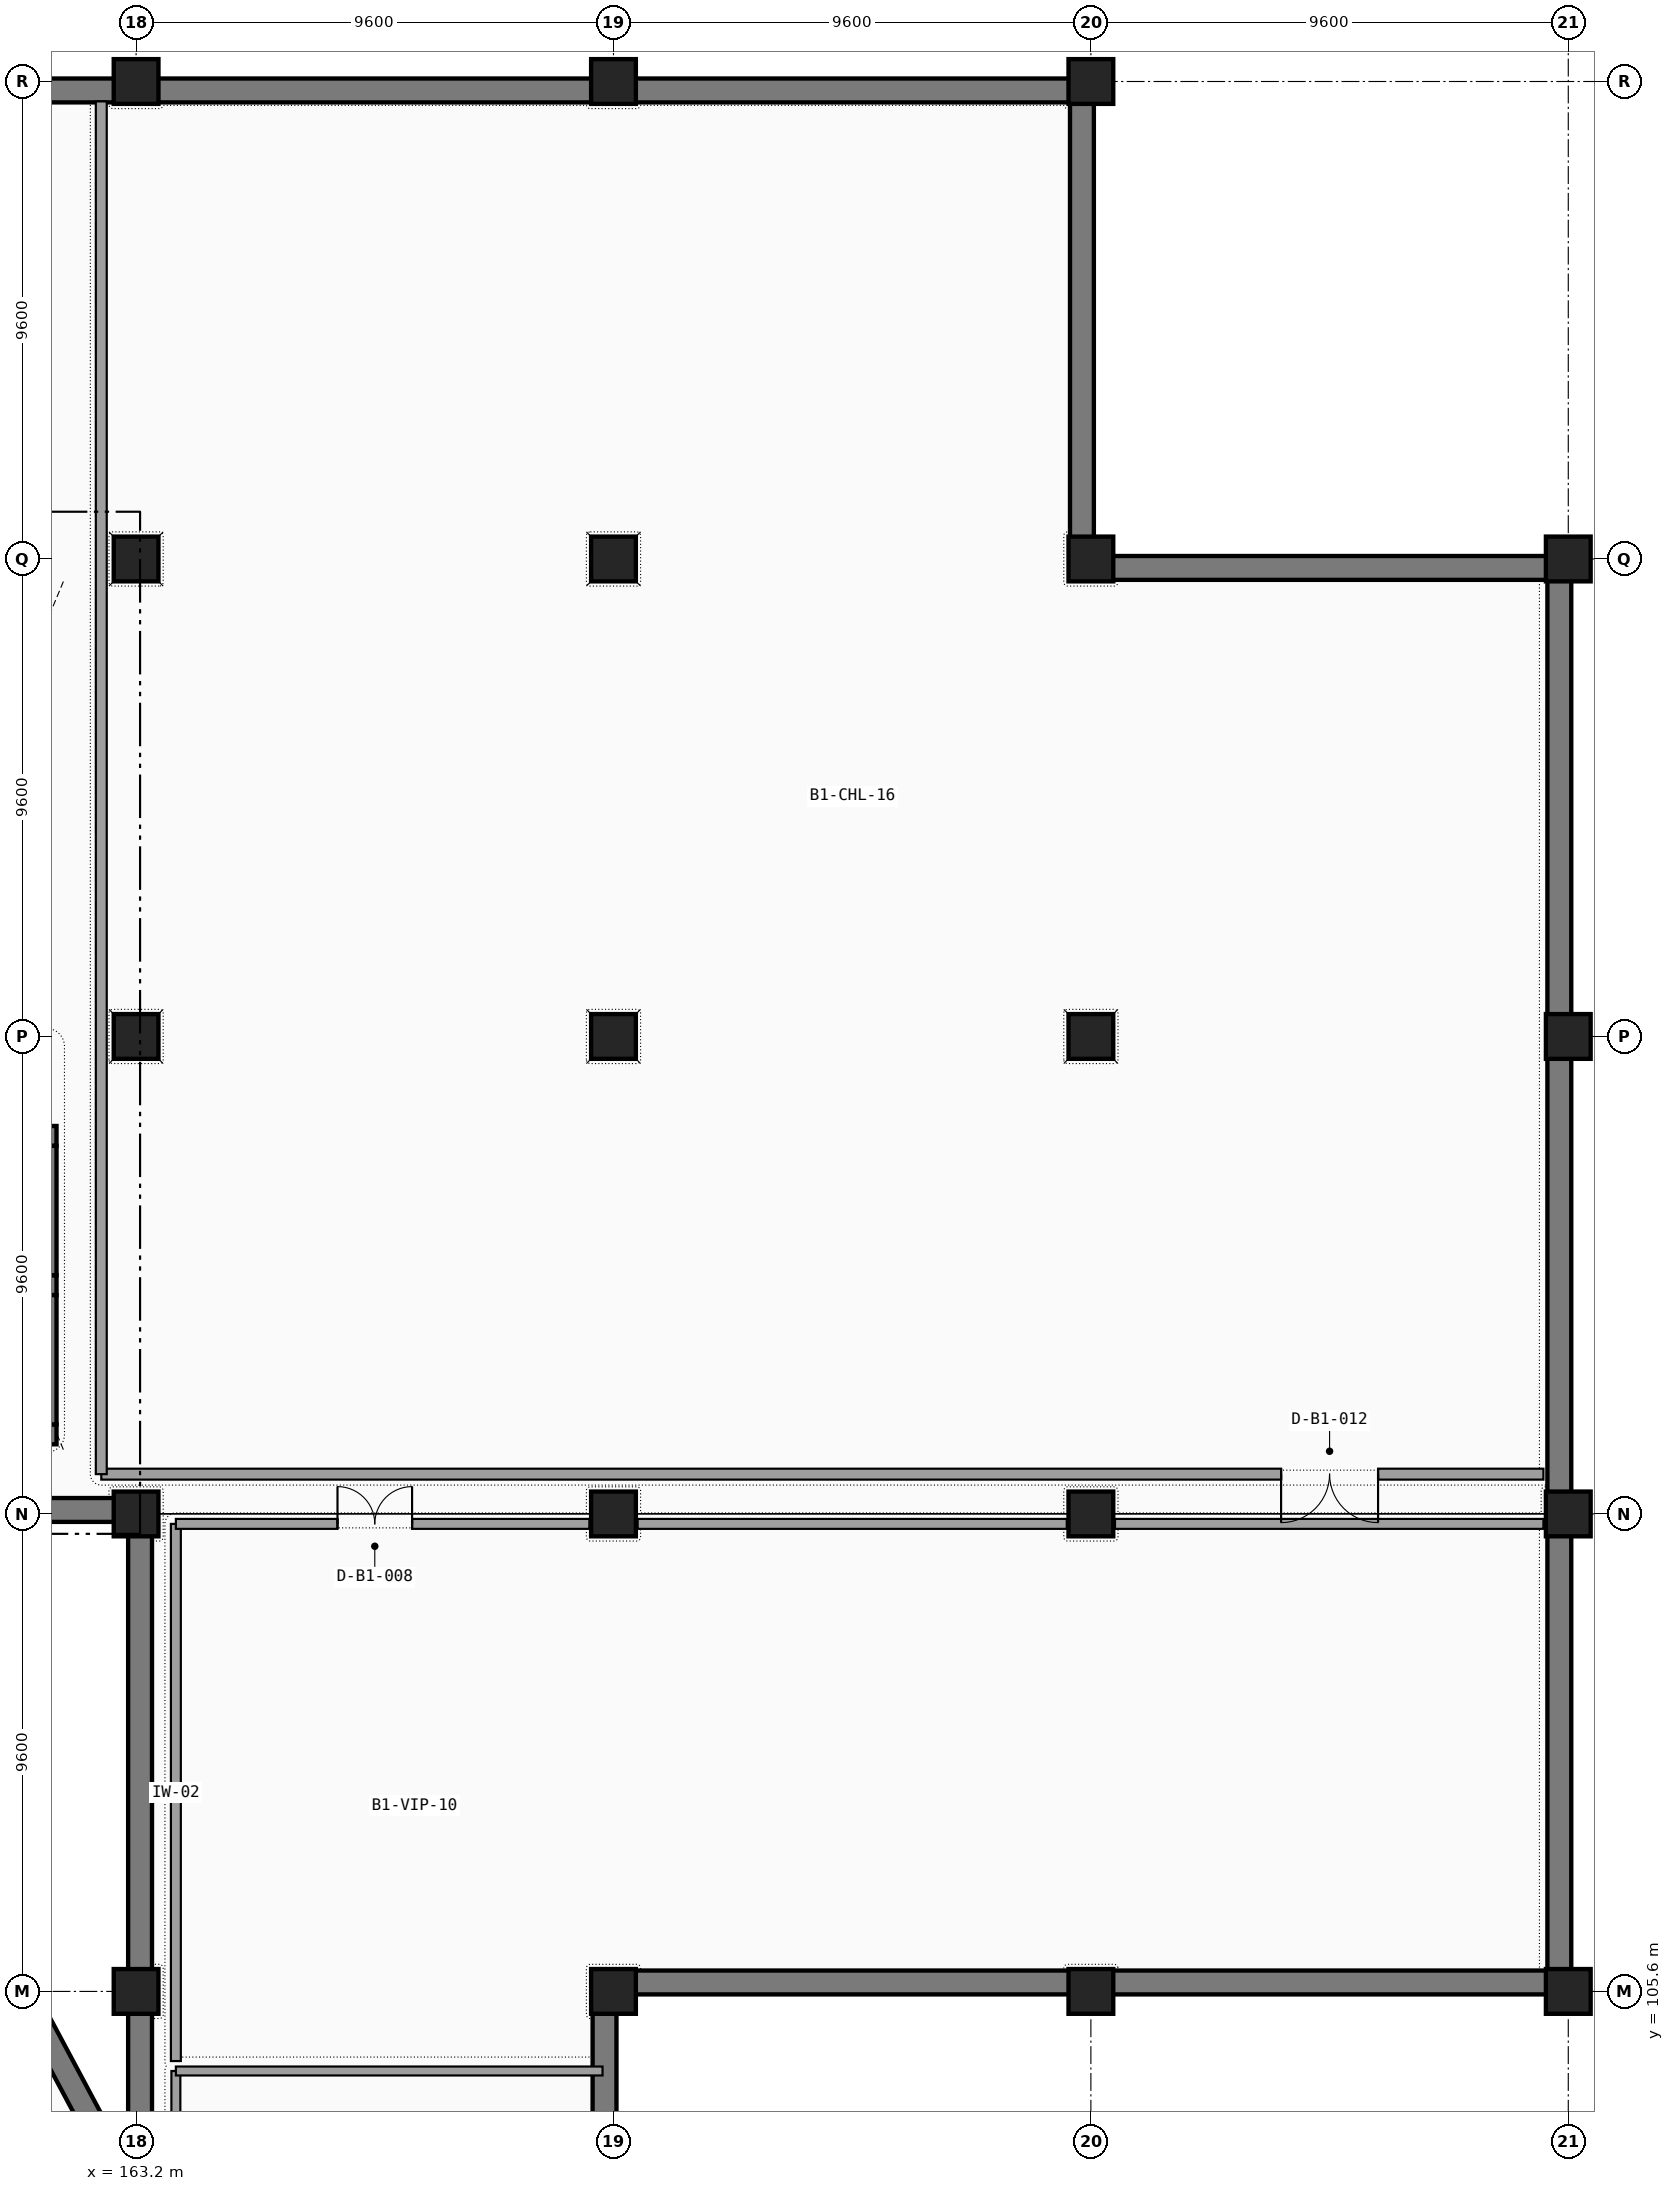
"""IFC4 building model, lengths in metres.
Left out: names, types, materials, properties, quantities, classifications, styles, units other than length and angle.
Written with IfcOpenShell. Run it as: python <this file> out.ifc"""

import sys

from ifc_helpers import new_model, si_unit, direction, frame, frame_2d, origin, origin_2d, place, context, subcontext, project, spatial, rectangle, extrude, element, fill, save


model = new_model("IFC4")
c1 = context("Model", 3, precision=1e-05, world=origin(), true_north=direction((0.0, 1.0)))
c2 = subcontext(c1, "Body", "Model", "MODEL_VIEW")
j1 = project(units=[si_unit("LENGTHUNIT", "METRE"), si_unit("PLANEANGLEUNIT", "RADIAN")], contexts=[c1])
p1 = place(None, origin())
s1 = spatial("IfcSite", under=j1, at=p1, CompositionType="ELEMENT")
p2 = place(p1, origin())
s2 = spatial("IfcBuilding", under=s1, at=p2, CompositionType="ELEMENT")
p3 = place(p2, frame((0.0, 0.0, -4.8)))
s3 = spatial("IfcBuildingStorey", under=s2, at=p3, CompositionType="ELEMENT", Elevation=-4.8)
for number, where, z_axis, x_axis in (
    (1, (163.2, 105.6, 0.0), (0.0, 0.0, 1.0), (1.0, 0.0, 0.0)),
    (2, (163.2, 115.2, 0.0), (0.0, 0.0, 1.0), (1.0, 0.0, 0.0)),
    (3, (163.2, 124.8, 0.0), (0.0, 0.0, 1.0), (1.0, 0.0, 0.0)),
    (4, (163.2, 134.4, 0.0), (0.0, 0.0, 1.0), (1.0, 0.0, 0.0)),
    (5, (163.2, 144.0, 0.0), (0.0, 0.0, 1.0), (1.0, 0.0, 0.0)),
    (6, (172.8, 105.6, 0.0), (0.0, 0.0, 1.0), (1.0, 0.0, 0.0)),
    (7, (172.8, 115.2, 0.0), (0.0, 0.0, 1.0), (1.0, 0.0, 0.0)),
    (8, (172.8, 124.8, 0.0), (0.0, 0.0, 1.0), (1.0, 0.0, 0.0)),
    (9, (172.8, 134.4, 0.0), (0.0, 0.0, 1.0), (1.0, 0.0, 0.0)),
    (10, (172.8, 144.0, 0.0), (0.0, 0.0, 1.0), (1.0, 0.0, 0.0)),
    (11, (182.4, 105.6, 0.0), (0.0, 0.0, 1.0), (1.0, 0.0, 0.0)),
    (12, (182.4, 115.2, 0.0), (0.0, 0.0, 1.0), (1.0, 0.0, 0.0)),
    (13, (182.4, 124.8, 0.0), (0.0, 0.0, 1.0), (1.0, 0.0, 0.0)),
    (14, (182.4, 134.4, 0.0), (0.0, 0.0, 1.0), (1.0, 0.0, 0.0)),
    (15, (182.4, 144.0, 0.0), (0.0, 0.0, 1.0), (1.0, 0.0, 0.0)),
    (16, (192.0, 105.6, 0.0), (0.0, 0.0, 1.0), (1.0, 0.0, 0.0)),
    (17, (192.0, 115.2, 0.0), (0.0, 0.0, 1.0), (1.0, 0.0, 0.0)),
    (18, (192.0, 124.8, 0.0), (0.0, 0.0, 1.0), (1.0, 0.0, 0.0)),
    (19, (192.0, 134.4, 0.0), (0.0, 0.0, 1.0), (1.0, 0.0, 0.0)),
):
    element("IfcColumn", number, at=place(p3, frame(where, z_axis=z_axis, x_axis=x_axis)), inside=s3, PredefinedType="COLUMN", context=c2, shape_type="SweptSolid", body=[
        extrude(rectangle(XDim=0.9, YDim=0.9, at=origin_2d()), origin(), (0.0, 0.0, 1.0), 4.8),
    ])
p4 = place(p3, frame((172.62, 96.43, 0.0), z_axis=(0.0, 0.0, 1.0), x_axis=(0.0, 1.0, 0.0)))
e20 = element("IfcWall", 20, at=p4, inside=s3, PredefinedType="USERDEFINED", context=c2, shape_type="SweptSolid", body=[
    extrude(rectangle(XDim=8.74, YDim=0.48, at=frame_2d((4.37, 0.0))), origin(), (0.0, 0.0, 1.0), 3.7),
])
for number, where, z_axis, x_axis in (
    (21, (173.23, 105.78, 0.0), (0.0, 0.0, 1.0), (1.0, 0.0, 0.0)),
    (22, (182.83, 105.78, 0.0), (0.0, 0.0, 1.0), (1.0, 0.0, 0.0)),
):
    element("IfcWall", number, at=place(p3, frame(where, z_axis=z_axis, x_axis=x_axis)), inside=s3, PredefinedType="USERDEFINED", context=c2, shape_type="SweptSolid", body=[
        extrude(rectangle(XDim=8.74, YDim=0.48, at=frame_2d((4.37, 0.0))), origin(), (0.0, 0.0, 1.0), 3.6),
    ])
p5 = place(p3, frame((191.82, 106.03, 0.0), z_axis=(0.0, 0.0, 1.0), x_axis=(0.0, 1.0, 0.0)))
e23 = element("IfcWall", 23, at=p5, inside=s3, PredefinedType="USERDEFINED", context=c2, shape_type="SweptSolid", body=[
    extrude(rectangle(XDim=8.74, YDim=0.48, at=frame_2d((4.37, 0.0))), origin(), (0.0, 0.0, 1.0), 3.573),
])
p6 = place(p3, frame((191.82, 115.63, 0.0), z_axis=(0.0, 0.0, 1.0), x_axis=(0.0, 1.0, 0.0)))
e24 = element("IfcWall", 24, at=p6, inside=s3, PredefinedType="USERDEFINED", context=c2, shape_type="SweptSolid", body=[
    extrude(rectangle(XDim=8.74, YDim=0.48, at=frame_2d((4.37, 0.0))), origin(), (0.0, 0.0, 1.0), 3.573),
])
p7 = place(p3, frame((191.82, 125.23, 0.0), z_axis=(0.0, 0.0, 1.0), x_axis=(0.0, 1.0, 0.0)))
e25 = element("IfcWall", 25, at=p7, inside=s3, PredefinedType="USERDEFINED", context=c2, shape_type="SweptSolid", body=[
    extrude(rectangle(XDim=8.74, YDim=0.48, at=frame_2d((4.37, 0.0))), origin(), (0.0, 0.0, 1.0), 3.75),
])
p8 = place(p3, frame((191.57, 134.22, 0.0), z_axis=(0.0, 0.0, 1.0), x_axis=(-1.0, 0.0, 0.0)))
e26 = element("IfcWall", 26, at=p8, inside=s3, PredefinedType="USERDEFINED", context=c2, shape_type="SweptSolid", body=[
    extrude(rectangle(XDim=8.74, YDim=0.48, at=frame_2d((4.37, 0.0))), origin(), (0.0, 0.0, 1.0), 3.6),
])
p9 = place(p3, frame((182.22, 134.83, 0.0), z_axis=(0.0, 0.0, 1.0), x_axis=(0.0, 1.0, 0.0)))
e27 = element("IfcWall", 27, at=p9, inside=s3, PredefinedType="USERDEFINED", context=c2, shape_type="SweptSolid", body=[
    extrude(rectangle(XDim=8.74, YDim=0.48, at=frame_2d((4.37, 0.0))), origin(), (0.0, 0.0, 1.0), 3.7),
])
p10 = place(p3, frame((181.97, 143.82, 0.0), z_axis=(0.0, 0.0, 1.0), x_axis=(-1.0, 0.0, 0.0)))
e28 = element("IfcWall", 28, at=p10, inside=s3, PredefinedType="USERDEFINED", context=c2, shape_type="SweptSolid", body=[
    extrude(rectangle(XDim=8.74, YDim=0.48, at=frame_2d((4.37, 0.0))), origin(), (0.0, 0.0, 1.0), 3.75),
])
p11 = place(p3, frame((172.37, 143.82, 0.0), z_axis=(0.0, 0.0, 1.0), x_axis=(-1.0, 0.0, 0.0)))
e29 = element("IfcWall", 29, at=p11, inside=s3, PredefinedType="USERDEFINED", context=c2, shape_type="SweptSolid", body=[
    extrude(rectangle(XDim=8.74, YDim=0.48, at=frame_2d((4.37, 0.0))), origin(), (0.0, 0.0, 1.0), 3.573),
])
for number, where, z_axis, x_axis in (
    (30, (162.77, 143.82, 0.0), (0.0, 0.0, 1.0), (-1.0, 0.0, 0.0)),
    (31, (154.03, 115.28, 0.0), (0.0, 0.0, 1.0), (1.0, 0.0, 0.0)),
    (32, (163.28, 114.77, 0.0), (0.0, 0.0, 1.0), (0.0, -1.0, 0.0)),
):
    element("IfcWall", number, at=place(p3, frame(where, z_axis=z_axis, x_axis=x_axis)), inside=s3, PredefinedType="USERDEFINED", context=c2, shape_type="SweptSolid", body=[
        extrude(rectangle(XDim=8.74, YDim=0.48, at=frame_2d((4.37, 0.0))), origin(), (0.0, 0.0, 1.0), 3.573),
    ])
p12 = place(p3, frame((163.28, 105.17, 0.0), z_axis=(0.0, 0.0, 1.0), x_axis=(0.0, -1.0, 0.0)))
e33 = element("IfcWall", 33, at=p12, inside=s3, PredefinedType="USERDEFINED", context=c2, shape_type="SweptSolid", body=[
    extrude(rectangle(XDim=2.896, YDim=0.48, at=frame_2d((1.448, 0.0))), origin(), (0.0, 0.0, 1.0), 3.573),
])
p13 = place(p3, frame((162.788, 102.093, 0.0), z_axis=(0.0, 0.0, 1.0), x_axis=(-0.47141409565, 0.881911985644, 0.0)))
e34 = element("IfcWall", 34, at=p13, inside=s3, PredefinedType="USERDEFINED", context=c2, shape_type="SweptSolid", body=[
    extrude(rectangle(XDim=4.356, YDim=0.48, at=frame_2d((2.178, 0.0))), origin(), (0.0, 0.0, 1.0), 3.654),
])
for number, where, z_axis, x_axis in (
    (35, (158.4, 116.8, 0.0), (0.0, 0.0, 1.0), (1.0, 0.0, 0.0)),
    (36, (161.6, 119.8, 0.0), (0.0, 0.0, 1.0), (-1.0, 0.0, 0.0)),
):
    element("IfcWall", number, at=place(p3, frame(where, z_axis=z_axis, x_axis=x_axis)), inside=s3, PredefinedType="SHEAR", context=c2, shape_type="SweptSolid", body=[
        extrude(rectangle(XDim=3.2, YDim=0.4, at=frame_2d((1.6, 0.0))), origin(), (0.0, 0.0, 1.0), 4.5),
    ])
p14 = place(p3, frame((161.4, 117.0, 0.0), z_axis=(0.0, 0.0, 1.0), x_axis=(0.0, 1.0, 0.0)))
e37 = element("IfcWall", 37, at=p14, inside=s3, PredefinedType="SHEAR", context=c2, shape_type="SweptSolid", body=[
    extrude(rectangle(XDim=2.6, YDim=0.4, at=frame_2d((1.3, 0.0))), origin(), (0.0, 0.0, 1.0), 4.5),
])
p15 = place(p3, frame((161.6, 122.8, 0.0), z_axis=(0.0, 0.0, 1.0), x_axis=(-1.0, 0.0, 0.0)))
e38 = element("IfcWall", 38, at=p15, inside=s3, PredefinedType="SHEAR", context=c2, shape_type="SweptSolid", body=[
    extrude(rectangle(XDim=3.2, YDim=0.4, at=frame_2d((1.6, 0.0))), origin(), (0.0, 0.0, 1.0), 4.5),
])
p16 = place(p3, frame((161.4, 120.0, 0.0), z_axis=(0.0, 0.0, 1.0), x_axis=(0.0, 1.0, 0.0)))
e39 = element("IfcWall", 39, at=p16, inside=s3, PredefinedType="SHEAR", context=c2, shape_type="SweptSolid", body=[
    extrude(rectangle(XDim=2.6, YDim=0.4, at=frame_2d((1.3, 0.0))), origin(), (0.0, 0.0, 1.0), 4.5),
])
p17 = place(p3, frame((164.0, 99.043, 0.0), z_axis=(0.0, 0.0, 1.0), x_axis=(0.0, 1.0, 0.0)))
e40 = element("IfcWall", 40, at=p17, inside=s3, PredefinedType="PARTITIONING", context=c2, shape_type="SweptSolid", body=[
    extrude(rectangle(XDim=4.957, YDim=0.18, at=frame_2d((2.479, 0.0))), origin(), (0.0, 0.0, 1.0), 3.967),
])
p18 = place(p3, frame((164.0, 104.0, 0.0), z_axis=(0.0, 0.0, 1.0), x_axis=(1.0, 0.0, 0.0)))
e41 = element("IfcWall", 41, at=p18, inside=s3, PredefinedType="PARTITIONING", context=c2, shape_type="SweptSolid", body=[
    extrude(rectangle(XDim=8.58, YDim=0.18, at=frame_2d((4.29, 0.0))), origin(), (0.0, 0.0, 1.0), 3.7),
])
p19 = place(p3, frame((164.0, 104.2, 0.0), z_axis=(0.0, 0.0, 1.0), x_axis=(0.0, 1.0, 0.0)))
e42 = element("IfcWall", 42, at=p19, inside=s3, PredefinedType="PARTITIONING", context=c2, shape_type="SweptSolid", body=[
    extrude(rectangle(XDim=10.8, YDim=0.2, at=frame_2d((5.4, 0.0))), origin(), (0.0, 0.0, 1.0), 3.654),
])
p20 = place(p3, frame((164.0, 115.0, 0.0), z_axis=(0.0, 0.0, 1.0), x_axis=(1.0, 0.0, 0.0)))
e43 = element("IfcWall", 43, at=p20, inside=s3, PredefinedType="PARTITIONING", context=c2, shape_type="SweptSolid", body=[
    extrude(rectangle(XDim=8.315, YDim=0.2, at=frame_2d((4.157, 0.0))), origin(), (0.0, 0.0, 1.0), 3.573),
])
p21 = place(p20, frame((3.25, 0.0, 0.0), z_axis=(0.0, 0.0, 1.0), x_axis=(1.0, 0.0, 0.0)))
e44 = element("IfcOpeningElement", 44, at=p21, cuts=e43, PredefinedType="OPENING", context=c2, shape_type="SweptSolid", body=[
    extrude(rectangle(XDim=1.5, YDim=2.25, at=frame_2d((0.75, 1.125))), frame((0.0, 0.11, 0.0), z_axis=(0.0, -1.0, 0.0), x_axis=(1.0, 0.0, 0.0)), (0.0, 0.0, 1.0), 0.22),
])
p22 = place(p3, frame((173.285, 115.0, 0.0), z_axis=(0.0, 0.0, 1.0), x_axis=(1.0, 0.0, 0.0)))
e45 = element("IfcWall", 45, at=p22, inside=s3, PredefinedType="PARTITIONING", context=c2, shape_type="SweptSolid", body=[
    extrude(rectangle(XDim=8.63, YDim=0.2, at=frame_2d((4.315, 0.0))), origin(), (0.0, 0.0, 1.0), 3.75),
])
p23 = place(p3, frame((182.885, 115.0, 0.0), z_axis=(0.0, 0.0, 1.0), x_axis=(1.0, 0.0, 0.0)))
e46 = element("IfcWall", 46, at=p23, inside=s3, PredefinedType="PARTITIONING", context=c2, shape_type="SweptSolid", body=[
    extrude(rectangle(XDim=8.615, YDim=0.2, at=frame_2d((4.308, 0.0))), origin(), (0.0, 0.0, 1.0), 3.75),
])
p24 = place(p3, frame((191.5, 116.0, 0.0), z_axis=(0.0, 0.0, 1.0), x_axis=(-1.0, 0.0, 0.0)))
e47 = element("IfcWall", 47, at=p24, inside=s3, PredefinedType="PARTITIONING", context=c2, shape_type="SweptSolid", body=[
    extrude(rectangle(XDim=29.0, YDim=0.22, at=frame_2d((14.5, 0.0))), origin(), (0.0, 0.0, 1.0), 3.573),
])
p25 = place(p24, frame((3.325, 0.0, 0.0), z_axis=(0.0, 0.0, 1.0), x_axis=(1.0, 0.0, 0.0)))
e48 = element("IfcOpeningElement", 48, at=p25, cuts=e47, PredefinedType="OPENING", context=c2, shape_type="SweptSolid", body=[
    extrude(rectangle(XDim=1.95, YDim=2.35, at=frame_2d((0.975, 1.175))), frame((0.0, 0.12, 0.0), z_axis=(0.0, -1.0, 0.0), x_axis=(1.0, 0.0, 0.0)), (0.0, 0.0, 1.0), 0.24),
])
p26 = place(p3, frame((162.5, 116.0, 0.0), z_axis=(0.0, 0.0, 1.0), x_axis=(0.0, 1.0, 0.0)))
e49 = element("IfcWall", 49, at=p26, inside=s3, PredefinedType="PARTITIONING", context=c2, shape_type="SweptSolid", body=[
    extrude(rectangle(XDim=27.6, YDim=0.22, at=frame_2d((13.8, 0.0))), origin(), (0.0, 0.0, 1.0), 3.654),
])
p27 = place(p21, origin())
e50 = element("IfcDoor", 50, at=p27, inside=s3, OperationType="DOUBLE_DOOR_SINGLE_SWING", PredefinedType="DOOR", context=c2, shape_type="SweptSolid", body=[
    extrude(rectangle(XDim=1.5, YDim=2.25, at=frame_2d((0.75, 1.125))), frame((0.0, 0.025, 0.0), z_axis=(0.0, -1.0, 0.0), x_axis=(1.0, 0.0, 0.0)), (0.0, 0.0, 1.0), 0.05),
])
fill(e44, e50)
p28 = place(p25, origin())
e51 = element("IfcDoor", 51, at=p28, inside=s3, OperationType="DOUBLE_DOOR_SINGLE_SWING", PredefinedType="DOOR", context=c2, shape_type="SweptSolid", body=[
    extrude(rectangle(XDim=1.95, YDim=2.35, at=frame_2d((0.975, 1.175))), frame((0.0, 0.025, 0.0), z_axis=(0.0, -1.0, 0.0), x_axis=(1.0, 0.0, 0.0)), (0.0, 0.0, 1.0), 0.05),
])
fill(e48, e51)
save(model, sys.argv[1])
